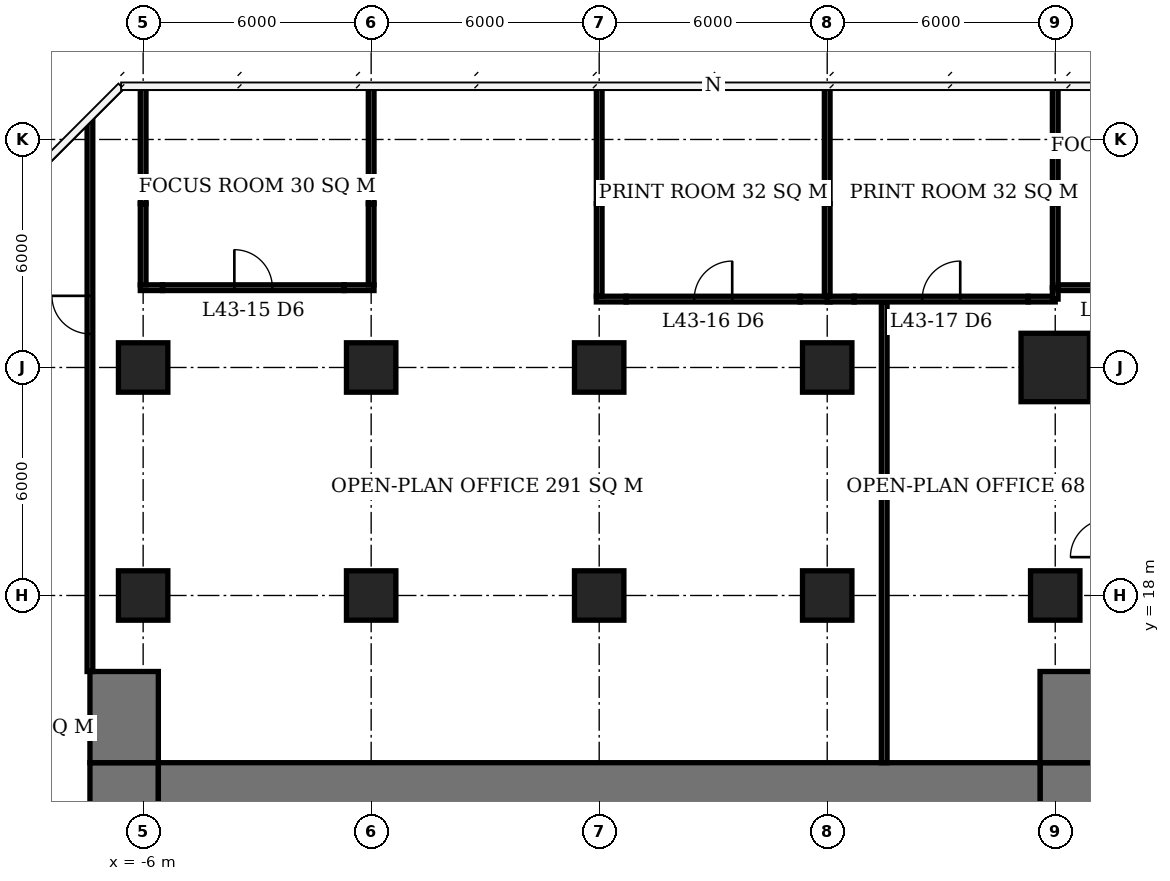
"""IFC4 building model, lengths in metres.
Left out: names, types, materials, properties, quantities, classifications, styles, units other than length and angle.
Written with IfcOpenShell. Run it as: python <this file> out.ifc"""

import sys

from ifc_helpers import new_model, si_unit, direction, frame, frame_2d, origin, origin_2d, place, context, subcontext, project, spatial, rectangle, extrude, element, fill, save


model = new_model("IFC4")
c1 = context("Model", 3, precision=1e-05, world=origin(), true_north=direction((0.0, 1.0)))
c2 = subcontext(c1, "Body", "Model", "MODEL_VIEW")
j1 = project(units=[si_unit("LENGTHUNIT", "METRE"), si_unit("PLANEANGLEUNIT", "RADIAN")], contexts=[c1])
p1 = place(None, origin())
s1 = spatial("IfcSite", under=j1, at=p1, CompositionType="ELEMENT")
p2 = place(p1, origin())
s2 = spatial("IfcBuilding", under=s1, at=p2, CompositionType="ELEMENT")
p3 = place(p2, frame((0.0, 0.0, 177.2)))
s3 = spatial("IfcBuildingStorey", under=s2, at=p3, CompositionType="ELEMENT", Elevation=177.2)
for number, where, z_axis, x_axis in (
    (1, (-6.0, 18.0, 0.0), (0.0, 0.0, 1.0), (1.0, 0.0, 0.0)),
    (2, (-6.0, 24.0, 0.0), (0.0, 0.0, 1.0), (1.0, 0.0, 0.0)),
    (3, (0.0, 18.0, 0.0), (0.0, 0.0, 1.0), (1.0, 0.0, 0.0)),
    (4, (0.0, 24.0, 0.0), (0.0, 0.0, 1.0), (1.0, 0.0, 0.0)),
    (5, (6.0, 18.0, 0.0), (0.0, 0.0, 1.0), (1.0, 0.0, 0.0)),
    (6, (6.0, 24.0, 0.0), (0.0, 0.0, 1.0), (1.0, 0.0, 0.0)),
    (7, (12.0, 18.0, 0.0), (0.0, 0.0, 1.0), (1.0, 0.0, 0.0)),
    (8, (12.0, 24.0, 0.0), (0.0, 0.0, 1.0), (1.0, 0.0, 0.0)),
    (9, (18.0, 18.0, 0.0), (0.0, 0.0, 1.0), (1.0, 0.0, 0.0)),
):
    element("IfcColumn", number, at=place(p3, frame(where, z_axis=z_axis, x_axis=x_axis)), inside=s3, PredefinedType="COLUMN", context=c2, shape_type="SweptSolid", body=[
        extrude(rectangle(XDim=1.3, YDim=1.3, at=origin_2d()), origin(), (0.0, 0.0, 1.0), 3.9),
    ])
p4 = place(p3, frame((18.0, 24.0, 0.0), z_axis=(0.0, 0.0, 1.0), x_axis=(1.0, 0.0, 0.0)))
e10 = element("IfcColumn", 10, at=p4, inside=s3, PredefinedType="COLUMN", context=c2, shape_type="SweptSolid", body=[
    extrude(rectangle(XDim=1.8, YDim=1.8, at=origin_2d()), origin(), (0.0, 0.0, 1.0), 3.9),
])
p5 = place(p3, frame((-5.6, 12.6, 0.0), z_axis=(0.0, 0.0, 1.0), x_axis=(1.0, 0.0, 0.0)))
e11 = element("IfcWall", 11, at=p5, inside=s3, PredefinedType="SHEAR", context=c2, shape_type="SweptSolid", body=[
    extrude(rectangle(XDim=23.2, YDim=2.0, at=frame_2d((11.6, 0.0))), origin(), (0.0, 0.0, 1.0), 3.9),
])
p6 = place(p3, frame((-6.5, -7.6, 0.0), z_axis=(0.0, 0.0, 1.0), x_axis=(0.0, 1.0, 0.0)))
e12 = element("IfcWall", 12, at=p6, inside=s3, PredefinedType="SHEAR", context=c2, shape_type="SweptSolid", body=[
    extrude(rectangle(XDim=21.2, YDim=1.8, at=frame_2d((10.6, 0.0))), origin(), (0.0, 0.0, 1.0), 3.9),
])
p7 = place(p6, frame((7.8, 0.0, 0.0)))
e13 = element("IfcOpeningElement", 13, at=p7, cuts=e12, PredefinedType="OPENING", context=c2, shape_type="SweptSolid", body=[
    extrude(rectangle(XDim=1.8, YDim=2.4, at=frame_2d((0.9, 1.2))), frame((0.0, 0.91, 0.0), z_axis=(0.0, -1.0, 0.0), x_axis=(1.0, 0.0, 0.0)), (0.0, 0.0, 1.0), 1.82),
])
p8 = place(p3, frame((18.5, -7.6, 0.0), z_axis=(0.0, 0.0, 1.0), x_axis=(0.0, 1.0, 0.0)))
e14 = element("IfcWall", 14, at=p8, inside=s3, PredefinedType="SHEAR", context=c2, shape_type="SweptSolid", body=[
    extrude(rectangle(XDim=21.2, YDim=1.8, at=frame_2d((10.6, 0.0))), origin(), (0.0, 0.0, 1.0), 3.9),
])
p9 = place(p8, frame((9.2, 0.0, 0.0)))
e15 = element("IfcOpeningElement", 15, at=p9, cuts=e14, PredefinedType="OPENING", context=c2, shape_type="SweptSolid", body=[
    extrude(rectangle(XDim=1.8, YDim=2.4, at=frame_2d((0.9, 1.2))), frame((0.0, 0.91, 0.0), z_axis=(0.0, -1.0, 0.0), x_axis=(1.0, 0.0, 0.0)), (0.0, 0.0, 1.0), 1.82),
])
for number, where, z_axis, x_axis in (
    (16, (-6.5, 13.6, 0.0), (0.0, 0.0, 1.0), (0.0, 1.0, 0.0)),
    (17, (18.5, 13.6, 0.0), (0.0, 0.0, 1.0), (0.0, 1.0, 0.0)),
):
    element("IfcWall", number, at=place(p3, frame(where, z_axis=z_axis, x_axis=x_axis)), inside=s3, PredefinedType="SHEAR", context=c2, shape_type="SweptSolid", body=[
        extrude(rectangle(XDim=2.4, YDim=1.8, at=frame_2d((1.2, 0.0))), origin(), (0.0, 0.0, 1.0), 3.9),
    ])
p10 = place(p3, frame((5.925, 25.8, 0.0), z_axis=(0.0, 0.0, 1.0), x_axis=(1.0, 0.0, 0.0)))
e18 = element("IfcWall", 18, at=p10, inside=s3, PredefinedType="PARTITIONING", context=c2, shape_type="SweptSolid", body=[
    extrude(rectangle(XDim=0.785, YDim=0.15, at=frame_2d((0.393, 0.0))), origin(), (0.0, 0.0, 1.0), 2.65),
])
p11 = place(p3, frame((6.71, 25.8, 0.0), z_axis=(0.0, 0.0, 1.0), x_axis=(1.0, 0.0, 0.0)))
e19 = element("IfcWall", 19, at=p11, inside=s3, PredefinedType="PARTITIONING", context=c2, shape_type="SweptSolid", body=[
    extrude(rectangle(XDim=4.58, YDim=0.15, at=frame_2d((2.29, 0.0))), origin(), (0.0, 0.0, 1.0), 3.65),
])
p12 = place(p11, frame((1.79, 0.0, 0.0)))
e20 = element("IfcOpeningElement", 20, at=p12, cuts=e19, PredefinedType="OPENING", context=c2, shape_type="SweptSolid", body=[
    extrude(rectangle(XDim=1.0, YDim=2.1, at=frame_2d((0.5, 1.05))), frame((0.0, 0.085, 0.0), z_axis=(0.0, -1.0, 0.0), x_axis=(1.0, 0.0, 0.0)), (0.0, 0.0, 1.0), 0.17),
])
p13 = place(p3, frame((11.29, 25.8, 0.0), z_axis=(0.0, 0.0, 1.0), x_axis=(1.0, 0.0, 0.0)))
e21 = element("IfcWall", 21, at=p13, inside=s3, PredefinedType="PARTITIONING", context=c2, shape_type="SweptSolid", body=[
    extrude(rectangle(XDim=0.785, YDim=0.15, at=frame_2d((0.393, 0.0))), origin(), (0.0, 0.0, 1.0), 2.65),
])
p14 = place(p3, frame((12.0, 25.8, 0.0), z_axis=(0.0, 0.0, 1.0), x_axis=(1.0, 0.0, 0.0)))
e22 = element("IfcWall", 22, at=p14, inside=s3, PredefinedType="PARTITIONING", context=c2, shape_type="SweptSolid", body=[
    extrude(rectangle(XDim=0.71, YDim=0.15, at=frame_2d((0.355, 0.0))), origin(), (0.0, 0.0, 1.0), 2.65),
])
p15 = place(p3, frame((12.71, 25.8, 0.0), z_axis=(0.0, 0.0, 1.0), x_axis=(1.0, 0.0, 0.0)))
e23 = element("IfcWall", 23, at=p15, inside=s3, PredefinedType="PARTITIONING", context=c2, shape_type="SweptSolid", body=[
    extrude(rectangle(XDim=4.58, YDim=0.15, at=frame_2d((2.29, 0.0))), origin(), (0.0, 0.0, 1.0), 3.65),
])
p16 = place(p15, frame((1.79, 0.0, 0.0)))
e24 = element("IfcOpeningElement", 24, at=p16, cuts=e23, PredefinedType="OPENING", context=c2, shape_type="SweptSolid", body=[
    extrude(rectangle(XDim=1.0, YDim=2.1, at=frame_2d((0.5, 1.05))), frame((0.0, 0.085, 0.0), z_axis=(0.0, -1.0, 0.0), x_axis=(1.0, 0.0, 0.0)), (0.0, 0.0, 1.0), 0.17),
])
p17 = place(p3, frame((17.29, 25.8, 0.0), z_axis=(0.0, 0.0, 1.0), x_axis=(1.0, 0.0, 0.0)))
e25 = element("IfcWall", 25, at=p17, inside=s3, PredefinedType="PARTITIONING", context=c2, shape_type="SweptSolid", body=[
    extrude(rectangle(XDim=0.71, YDim=0.15, at=frame_2d((0.355, 0.0))), origin(), (0.0, 0.0, 1.0), 2.65),
])
p18 = place(p3, frame((-6.075, 26.1, 0.0), z_axis=(0.0, 0.0, 1.0), x_axis=(1.0, 0.0, 0.0)))
e26 = element("IfcWall", 26, at=p18, inside=s3, PredefinedType="PARTITIONING", context=c2, shape_type="SweptSolid", body=[
    extrude(rectangle(XDim=0.585, YDim=0.15, at=frame_2d((0.292, 0.0))), origin(), (0.0, 0.0, 1.0), 2.65),
])
p19 = place(p3, frame((-5.49, 26.1, 0.0), z_axis=(0.0, 0.0, 1.0), x_axis=(1.0, 0.0, 0.0)))
e27 = element("IfcWall", 27, at=p19, inside=s3, PredefinedType="PARTITIONING", context=c2, shape_type="SweptSolid", body=[
    extrude(rectangle(XDim=4.78, YDim=0.15, at=frame_2d((2.39, 0.0))), origin(), (0.0, 0.0, 1.0), 3.65),
])
p20 = place(p19, frame((1.89, 0.0, 0.0)))
e28 = element("IfcOpeningElement", 28, at=p20, cuts=e27, PredefinedType="OPENING", context=c2, shape_type="SweptSolid", body=[
    extrude(rectangle(XDim=1.0, YDim=2.1, at=frame_2d((0.5, 1.05))), frame((0.0, 0.085, 0.0), z_axis=(0.0, -1.0, 0.0), x_axis=(1.0, 0.0, 0.0)), (0.0, 0.0, 1.0), 0.17),
])
p21 = place(p3, frame((-0.71, 26.1, 0.0), z_axis=(0.0, 0.0, 1.0), x_axis=(1.0, 0.0, 0.0)))
e29 = element("IfcWall", 29, at=p21, inside=s3, PredefinedType="PARTITIONING", context=c2, shape_type="SweptSolid", body=[
    extrude(rectangle(XDim=0.785, YDim=0.15, at=frame_2d((0.393, 0.0))), origin(), (0.0, 0.0, 1.0), 2.65),
])
p22 = place(p3, frame((18.075, 26.1, 0.0), z_axis=(0.0, 0.0, 1.0), x_axis=(1.0, 0.0, 0.0)))
e30 = element("IfcWall", 30, at=p22, inside=s3, PredefinedType="PARTITIONING", context=c2, shape_type="SweptSolid", body=[
    extrude(rectangle(XDim=3.817, YDim=0.15, at=frame_2d((1.909, 0.0))), origin(), (0.0, 0.0, 1.0), 2.65),
])
p23 = place(p22, frame((1.425, 0.0, 0.0)))
e31 = element("IfcOpeningElement", 31, at=p23, cuts=e30, PredefinedType="OPENING", context=c2, shape_type="SweptSolid", body=[
    extrude(rectangle(XDim=1.0, YDim=2.1, at=frame_2d((0.5, 1.05))), frame((0.0, 0.085, 0.0), z_axis=(0.0, -1.0, 0.0), x_axis=(1.0, 0.0, 0.0)), (0.0, 0.0, 1.0), 0.17),
])
p24 = place(p3, frame((-6.0, 26.175, 0.0), z_axis=(0.0, 0.0, 1.0), x_axis=(0.0, 1.0, 0.0)))
e32 = element("IfcWall", 32, at=p24, inside=s3, PredefinedType="PARTITIONING", context=c2, shape_type="SweptSolid", body=[
    extrude(rectangle(XDim=2.135, YDim=0.15, at=frame_2d((1.067, 0.0))), origin(), (0.0, 0.0, 1.0), 2.65),
])
p25 = place(p3, frame((-6.0, 28.31, 0.0), z_axis=(0.0, 0.0, 1.0), x_axis=(0.0, 1.0, 0.0)))
e33 = element("IfcWall", 33, at=p25, inside=s3, PredefinedType="PARTITIONING", context=c2, shape_type="SweptSolid", body=[
    extrude(rectangle(XDim=3.09, YDim=0.15, at=frame_2d((1.545, 0.0))), origin(), (0.0, 0.0, 1.0), 3.65),
])
p26 = place(p3, frame((0.0, 26.175, 0.0), z_axis=(0.0, 0.0, 1.0), x_axis=(0.0, 1.0, 0.0)))
e34 = element("IfcWall", 34, at=p26, inside=s3, PredefinedType="PARTITIONING", context=c2, shape_type="SweptSolid", body=[
    extrude(rectangle(XDim=2.135, YDim=0.15, at=frame_2d((1.067, 0.0))), origin(), (0.0, 0.0, 1.0), 2.65),
])
p27 = place(p3, frame((0.0, 28.31, 0.0), z_axis=(0.0, 0.0, 1.0), x_axis=(0.0, 1.0, 0.0)))
e35 = element("IfcWall", 35, at=p27, inside=s3, PredefinedType="PARTITIONING", context=c2, shape_type="SweptSolid", body=[
    extrude(rectangle(XDim=3.09, YDim=0.15, at=frame_2d((1.545, 0.0))), origin(), (0.0, 0.0, 1.0), 3.65),
])
p28 = place(p3, frame((6.0, 25.875, 0.0), z_axis=(0.0, 0.0, 1.0), x_axis=(0.0, 1.0, 0.0)))
e36 = element("IfcWall", 36, at=p28, inside=s3, PredefinedType="PARTITIONING", context=c2, shape_type="SweptSolid", body=[
    extrude(rectangle(XDim=2.435, YDim=0.15, at=frame_2d((1.218, 0.0))), origin(), (0.0, 0.0, 1.0), 2.65),
])
p29 = place(p3, frame((6.0, 28.31, 0.0), z_axis=(0.0, 0.0, 1.0), x_axis=(0.0, 1.0, 0.0)))
e37 = element("IfcWall", 37, at=p29, inside=s3, PredefinedType="PARTITIONING", context=c2, shape_type="SweptSolid", body=[
    extrude(rectangle(XDim=3.04, YDim=0.15, at=frame_2d((1.52, 0.0))), origin(), (0.0, 0.0, 1.0), 3.65),
])
p30 = place(p3, frame((12.0, 25.875, 0.0), z_axis=(0.0, 0.0, 1.0), x_axis=(0.0, 1.0, 0.0)))
e38 = element("IfcWall", 38, at=p30, inside=s3, PredefinedType="PARTITIONING", context=c2, shape_type="SweptSolid", body=[
    extrude(rectangle(XDim=2.435, YDim=0.15, at=frame_2d((1.218, 0.0))), origin(), (0.0, 0.0, 1.0), 2.65),
])
p31 = place(p3, frame((12.0, 28.31, 0.0), z_axis=(0.0, 0.0, 1.0), x_axis=(0.0, 1.0, 0.0)))
e39 = element("IfcWall", 39, at=p31, inside=s3, PredefinedType="PARTITIONING", context=c2, shape_type="SweptSolid", body=[
    extrude(rectangle(XDim=3.04, YDim=0.15, at=frame_2d((1.52, 0.0))), origin(), (0.0, 0.0, 1.0), 3.65),
])
p32 = place(p3, frame((18.0, 25.8, 0.0), z_axis=(0.0, 0.0, 1.0), x_axis=(0.0, 1.0, 0.0)))
e40 = element("IfcWall", 40, at=p32, inside=s3, PredefinedType="PARTITIONING", context=c2, shape_type="SweptSolid", body=[
    extrude(rectangle(XDim=0.3, YDim=0.15, at=frame_2d((0.15, 0.0))), origin(), (0.0, 0.0, 1.0), 2.65),
])
p33 = place(p3, frame((18.0, 26.1, 0.0), z_axis=(0.0, 0.0, 1.0), x_axis=(0.0, 1.0, 0.0)))
e41 = element("IfcWall", 41, at=p33, inside=s3, PredefinedType="PARTITIONING", context=c2, shape_type="SweptSolid", body=[
    extrude(rectangle(XDim=2.21, YDim=0.15, at=frame_2d((1.105, 0.0))), origin(), (0.0, 0.0, 1.0), 2.65),
])
p34 = place(p3, frame((18.0, 28.31, 0.0), z_axis=(0.0, 0.0, 1.0), x_axis=(0.0, 1.0, 0.0)))
e42 = element("IfcWall", 42, at=p34, inside=s3, PredefinedType="PARTITIONING", context=c2, shape_type="SweptSolid", body=[
    extrude(rectangle(XDim=3.09, YDim=0.15, at=frame_2d((1.545, 0.0))), origin(), (0.0, 0.0, 1.0), 3.65),
])
p35 = place(p3, frame((-7.4, 16.0, 0.0), z_axis=(0.0, 0.0, 1.0), x_axis=(0.0, 1.0, 0.0)))
e43 = element("IfcWall", 43, at=p35, inside=s3, PredefinedType="PARTITIONING", context=c2, shape_type="SweptSolid", body=[
    extrude(rectangle(XDim=14.489, YDim=0.15, at=frame_2d((7.245, 0.0))), origin(), (0.0, 0.0, 1.0), 3.65),
])
p36 = place(p35, frame((8.885, 0.0, 0.0)))
e44 = element("IfcOpeningElement", 44, at=p36, cuts=e43, PredefinedType="OPENING", context=c2, shape_type="SweptSolid", body=[
    extrude(rectangle(XDim=1.0, YDim=2.1, at=frame_2d((0.5, 1.05))), frame((0.0, 0.085, 0.0), z_axis=(0.0, -1.0, 0.0), x_axis=(1.0, 0.0, 0.0)), (0.0, 0.0, 1.0), 0.17),
])
p37 = place(p3, frame((13.5, 13.6, 0.0), z_axis=(0.0, 0.0, 1.0), x_axis=(0.0, 1.0, 0.0)))
e45 = element("IfcWall", 45, at=p37, inside=s3, PredefinedType="PARTITIONING", context=c2, shape_type="SweptSolid", body=[
    extrude(rectangle(XDim=12.125, YDim=0.15, at=frame_2d((6.062, 0.0))), origin(), (0.0, 0.0, 1.0), 3.65),
])
p38 = place(p20, origin())
e46 = element("IfcDoor", 46, at=p38, inside=s3, OperationType="SINGLE_SWING_LEFT", PredefinedType="DOOR", context=c2, shape_type="SweptSolid", body=[
    extrude(rectangle(XDim=1.0, YDim=2.1, at=frame_2d((0.5, 1.05))), frame((0.0, 0.025, 0.0), z_axis=(0.0, -1.0, 0.0), x_axis=(1.0, 0.0, 0.0)), (0.0, 0.0, 1.0), 0.05),
])
fill(e28, e46)
p39 = place(p12, origin())
e47 = element("IfcDoor", 47, at=p39, inside=s3, OperationType="SINGLE_SWING_RIGHT", PredefinedType="DOOR", context=c2, shape_type="SweptSolid", body=[
    extrude(rectangle(XDim=1.0, YDim=2.1, at=frame_2d((0.5, 1.05))), frame((0.0, 0.025, 0.0), z_axis=(0.0, -1.0, 0.0), x_axis=(1.0, 0.0, 0.0)), (0.0, 0.0, 1.0), 0.05),
])
fill(e20, e47)
p40 = place(p16, origin())
e48 = element("IfcDoor", 48, at=p40, inside=s3, OperationType="SINGLE_SWING_RIGHT", PredefinedType="DOOR", context=c2, shape_type="SweptSolid", body=[
    extrude(rectangle(XDim=1.0, YDim=2.1, at=frame_2d((0.5, 1.05))), frame((0.0, 0.025, 0.0), z_axis=(0.0, -1.0, 0.0), x_axis=(1.0, 0.0, 0.0)), (0.0, 0.0, 1.0), 0.05),
])
fill(e24, e48)
p41 = place(p36, origin())
e49 = element("IfcDoor", 49, at=p41, inside=s3, OperationType="SINGLE_SWING_RIGHT", PredefinedType="DOOR", context=c2, shape_type="SweptSolid", body=[
    extrude(rectangle(XDim=1.0, YDim=2.1, at=frame_2d((0.5, 1.05))), frame((0.0, 0.025, 0.0), z_axis=(0.0, -1.0, 0.0), x_axis=(1.0, 0.0, 0.0)), (0.0, 0.0, 1.0), 0.05),
])
fill(e44, e49)
save(model, sys.argv[1])
